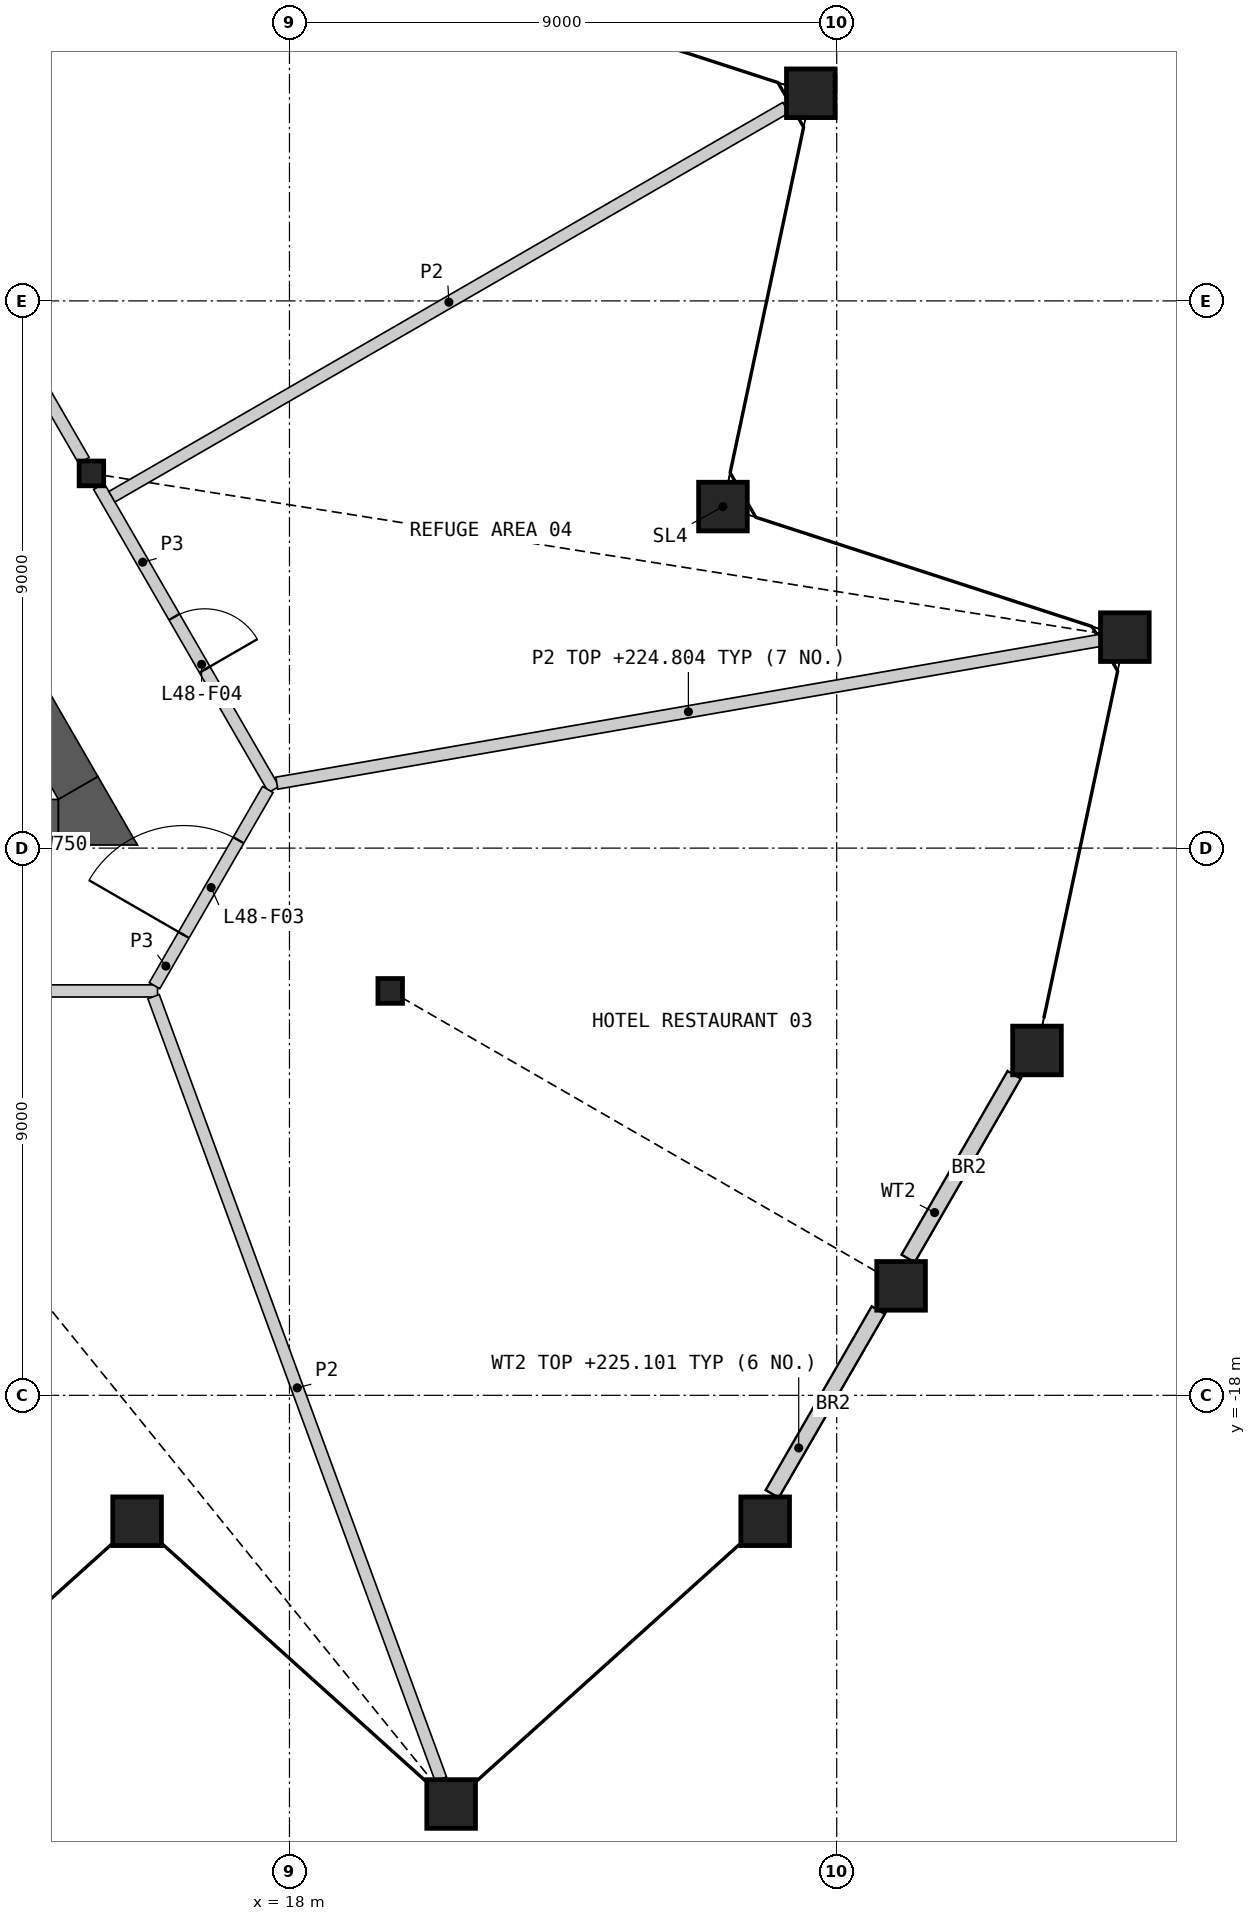
"""IFC4 building model, lengths in metres.
Left out: names, types, materials, properties, quantities, classifications, styles, units other than length and angle.
Written with IfcOpenShell. Run it as: python <this file> out.ifc"""

import sys

from ifc_helpers import new_model, si_unit, direction, frame, frame_2d, origin, origin_2d, place, context, subcontext, project, spatial, polyline, rectangle, hollow_rectangle, i_section, outline, extrude, element, fill, save


model = new_model("IFC4")
c1 = context("Model", 3, precision=1e-05, world=origin(), true_north=direction((0.0, 1.0)))
c2 = subcontext(c1, "Body", "Model", "MODEL_VIEW")
j1 = project(units=[si_unit("LENGTHUNIT", "METRE"), si_unit("PLANEANGLEUNIT", "RADIAN")], contexts=[c1])
p1 = place(None, origin())
s1 = spatial("IfcSite", under=j1, at=p1, CompositionType="ELEMENT")
p2 = place(p1, origin())
s2 = spatial("IfcBuilding", under=s1, at=p2, CompositionType="ELEMENT")
p3 = place(p2, frame((0.0, 0.0, 216.0)))
s3 = spatial("IfcBuildingStorey", under=s2, at=p3, CompositionType="ELEMENT", Elevation=216.0)
for number, where, z_axis, x_axis in (
    (1, (15.494, -20.071, 0.0), (0.0, 0.0, 1.0), (1.0, 0.0, 0.0)),
    (2, (20.659, -24.722, 0.0), (0.0, 0.0, 1.0), (1.0, 0.0, 0.0)),
    (3, (25.823, -20.071, 0.0), (0.0, 0.0, 1.0), (1.0, 0.0, 0.0)),
    (4, (28.059, -16.2, 0.0), (0.0, 0.0, 1.0), (1.0, 0.0, 0.0)),
    (5, (30.294, -12.328, 0.0), (0.0, 0.0, 1.0), (1.0, 0.0, 0.0)),
    (6, (31.739, -5.53, 0.0), (0.0, 0.0, 1.0), (1.0, 0.0, 0.0)),
    (7, (25.129, -3.383, 0.0), (0.0, 0.0, 1.0), (1.0, 0.0, 0.0)),
    (8, (26.574, 3.415, 0.0), (0.0, 0.0, 1.0), (1.0, 0.0, 0.0)),
):
    element("IfcColumn", number, at=place(p3, frame(where, z_axis=z_axis, x_axis=x_axis)), inside=s3, PredefinedType="COLUMN", context=c2, shape_type="SweptSolid", body=[
        extrude(hollow_rectangle(XDim=0.8, YDim=0.8, WallThickness=0.05, at=origin_2d()), origin(), (0.0, 0.0, 1.0), 10.0),
    ])
for number, where, z_axis, x_axis in (
    (9, (19.657, -11.349, 0.0), (0.0, 0.0, 1.0), (1.0, 0.0, 0.0)),
    (10, (14.743, -2.837, 0.0), (0.0, 0.0, 1.0), (1.0, 0.0, 0.0)),
):
    element("IfcColumn", number, at=place(p3, frame(where, z_axis=z_axis, x_axis=x_axis)), inside=s3, PredefinedType="COLUMN", context=c2, shape_type="SweptSolid", body=[
        extrude(i_section(OverallWidth=0.404, OverallDepth=0.407, WebThickness=0.027, FlangeThickness=0.044, at=origin_2d()), origin(), (0.0, 0.0, 1.0), 10.0),
    ])
p4 = place(p3, frame((25.939, -19.621, 0.0), z_axis=(0.0, 0.0, 1.0), x_axis=(0.500037421966, 0.866003797124, 0.0)))
e11 = element("IfcWall", 11, at=p4, inside=s3, PredefinedType="SOLIDWALL", context=c2, shape_type="SweptSolid", body=[
    extrude(rectangle(XDim=3.489, YDim=0.25, at=frame_2d((1.745, 0.0))), origin(), (0.0, 0.0, 1.0), 9.101),
])
p5 = place(p3, frame((28.174, -15.75, 0.0), z_axis=(0.0, 0.0, 1.0), x_axis=(0.499984940993, 0.866034097932, 0.0)))
e12 = element("IfcWall", 12, at=p5, inside=s3, PredefinedType="SOLIDWALL", context=c2, shape_type="SweptSolid", body=[
    extrude(rectangle(XDim=3.489, YDim=0.25, at=frame_2d((1.744, 0.0))), origin(), (0.0, 0.0, 1.0), 9.101),
])
p6 = place(p3, frame((9.351, -8.574, 0.0), z_axis=(0.0, 0.0, 1.0), x_axis=(1.0, 0.0, 0.0)))
e13 = element("IfcWall", 13, at=p6, inside=s3, PredefinedType="SHEAR", context=c2, shape_type="SweptSolid", body=[
    extrude(rectangle(XDim=4.85, YDim=0.75, at=frame_2d((2.425, 0.0))), origin(), (0.0, 0.0, 1.0), 9.65),
])
p7 = place(p3, frame((14.526, -8.011, 0.0), z_axis=(0.0, 0.0, 1.0), x_axis=(-0.499981157383, 0.866036282301, 0.0)))
e14 = element("IfcWall", 14, at=p7, inside=s3, PredefinedType="SHEAR", context=c2, shape_type="SweptSolid", body=[
    extrude(rectangle(XDim=10.429, YDim=0.75, at=frame_2d((5.215, 0.0))), origin(), (0.0, 0.0, 1.0), 9.65),
])
p8 = place(p3, origin())
e15 = element("IfcWall", 15, at=p8, inside=s3, PredefinedType="SHEAR", context=c2, shape_type="SweptSolid", body=[
    extrude(outline(polyline([(14.201, -8.949), (14.201, -8.199), (14.851, -7.824), (15.5, -8.949), (14.201, -8.949)])), origin(), (0.0, 0.0, 1.0), 9.65),
])
p9 = place(p3, frame((9.952, 5.461, 0.0), z_axis=(0.0, 0.0, 1.0), x_axis=(0.50000393355, -0.866023132736, 0.0)))
e16 = element("IfcWall", 16, at=p9, inside=s3, PredefinedType="PARTITIONING", context=c2, shape_type="SweptSolid", body=[
    extrude(rectangle(XDim=9.335, YDim=0.2, at=frame_2d((4.667, 0.0))), origin(), (0.0, 0.0, 1.0), 9.65),
])
p10 = place(p3, frame((10.042, -11.349, 0.0), z_axis=(0.0, 0.0, 1.0), x_axis=(1.0, 0.0, 0.0)))
e17 = element("IfcWall", 17, at=p10, inside=s3, PredefinedType="PARTITIONING", context=c2, shape_type="SweptSolid", body=[
    extrude(rectangle(XDim=5.789, YDim=0.2, at=frame_2d((2.894, 0.0))), origin(), (0.0, 0.0, 1.0), 9.65),
])
p11 = place(p3, frame((14.866, -3.051, 0.0), z_axis=(0.0, 0.0, 1.0), x_axis=(0.499975807604, -0.86603937082, 0.0)))
e18 = element("IfcWall", 18, at=p11, inside=s3, PredefinedType="PARTITIONING", context=c2, shape_type="SweptSolid", body=[
    extrude(rectangle(XDim=5.756, YDim=0.2, at=frame_2d((2.878, 0.0))), origin(), (0.0, 0.0, 1.0), 9.65),
])
p12 = place(p11, frame((2.479, 0.0, 0.0)))
e19 = element("IfcOpeningElement", 19, at=p12, cuts=e18, PredefinedType="OPENING", context=c2, shape_type="SweptSolid", body=[
    extrude(rectangle(XDim=1.0, YDim=2.1, at=frame_2d((0.5, 1.05))), frame((0.0, 0.11, 0.0), z_axis=(0.0, -1.0, 0.0), x_axis=(1.0, 0.0, 0.0)), (0.0, 0.0, 1.0), 0.22),
])
p13 = place(p3, frame((15.781, -11.262, 0.0), z_axis=(0.0, 0.0, 1.0), x_axis=(0.499958791762, 0.866049194065, 0.0)))
e20 = element("IfcWall", 20, at=p13, inside=s3, PredefinedType="PARTITIONING", context=c2, shape_type="SweptSolid", body=[
    extrude(rectangle(XDim=3.726, YDim=0.2, at=frame_2d((1.863, 0.0))), origin(), (0.0, 0.0, 1.0), 9.65),
])
p14 = place(p13, frame((0.963, 0.0, 0.0)))
e21 = element("IfcOpeningElement", 21, at=p14, cuts=e20, PredefinedType="OPENING", context=c2, shape_type="SweptSolid", body=[
    extrude(rectangle(XDim=1.8, YDim=2.1, at=frame_2d((0.9, 1.05))), frame((0.0, 0.11, 0.0), z_axis=(0.0, -1.0, 0.0), x_axis=(1.0, 0.0, 0.0)), (0.0, 0.0, 1.0), 0.22),
])
p15 = place(p3, frame((17.792, -7.932, 0.0), z_axis=(0.0, 0.0, 1.0), x_axis=(0.985288995773, 0.170896444691, 0.0)))
e22 = element("IfcWall", 22, at=p15, inside=s3, PredefinedType="PARTITIONING", context=c2, shape_type="SweptSolid", body=[
    extrude(rectangle(XDim=13.739, YDim=0.2, at=frame_2d((6.869, 0.0))), origin(), (0.0, 0.0, 1.0), 8.804),
])
p16 = place(p3, frame((15.765, -11.443, 0.0), z_axis=(0.0, 0.0, 1.0), x_axis=(0.344647088239, -0.938732328498, 0.0)))
e23 = element("IfcWall", 23, at=p16, inside=s3, PredefinedType="PARTITIONING", context=c2, shape_type="SweptSolid", body=[
    extrude(rectangle(XDim=13.708, YDim=0.2, at=frame_2d((6.854, 0.0))), origin(), (0.0, 0.0, 1.0), 8.804),
])
p17 = place(p3, frame((15.08, -3.221, 0.0), z_axis=(0.0, 0.0, 1.0), x_axis=(0.866024222022, 0.500002046867, 0.0)))
e24 = element("IfcWall", 24, at=p17, inside=s3, PredefinedType="PARTITIONING", context=c2, shape_type="SweptSolid", body=[
    extrude(rectangle(XDim=12.799, YDim=0.2, at=frame_2d((6.4, 0.0))), origin(), (0.0, 0.0, 1.0), 8.804),
])
p18 = place(p14, origin())
e25 = element("IfcDoor", 25, at=p18, inside=s3, OperationType="DOUBLE_DOOR_SINGLE_SWING", PredefinedType="DOOR", context=c2, shape_type="SweptSolid", body=[
    extrude(rectangle(XDim=1.8, YDim=2.1, at=frame_2d((0.9, 1.05))), frame((0.0, 0.025, 0.0), z_axis=(0.0, -1.0, 0.0), x_axis=(1.0, 0.0, 0.0)), (0.0, 0.0, 1.0), 0.05),
])
fill(e21, e25)
p19 = place(p12, origin())
e26 = element("IfcDoor", 26, at=p19, inside=s3, OperationType="SINGLE_SWING_RIGHT", PredefinedType="DOOR", context=c2, shape_type="SweptSolid", body=[
    extrude(rectangle(XDim=1.0, YDim=2.1, at=frame_2d((0.5, 1.05))), frame((0.0, 0.025, 0.0), z_axis=(0.0, -1.0, 0.0), x_axis=(1.0, 0.0, 0.0)), (0.0, 0.0, 1.0), 0.05),
])
fill(e19, e26)
save(model, sys.argv[1])
